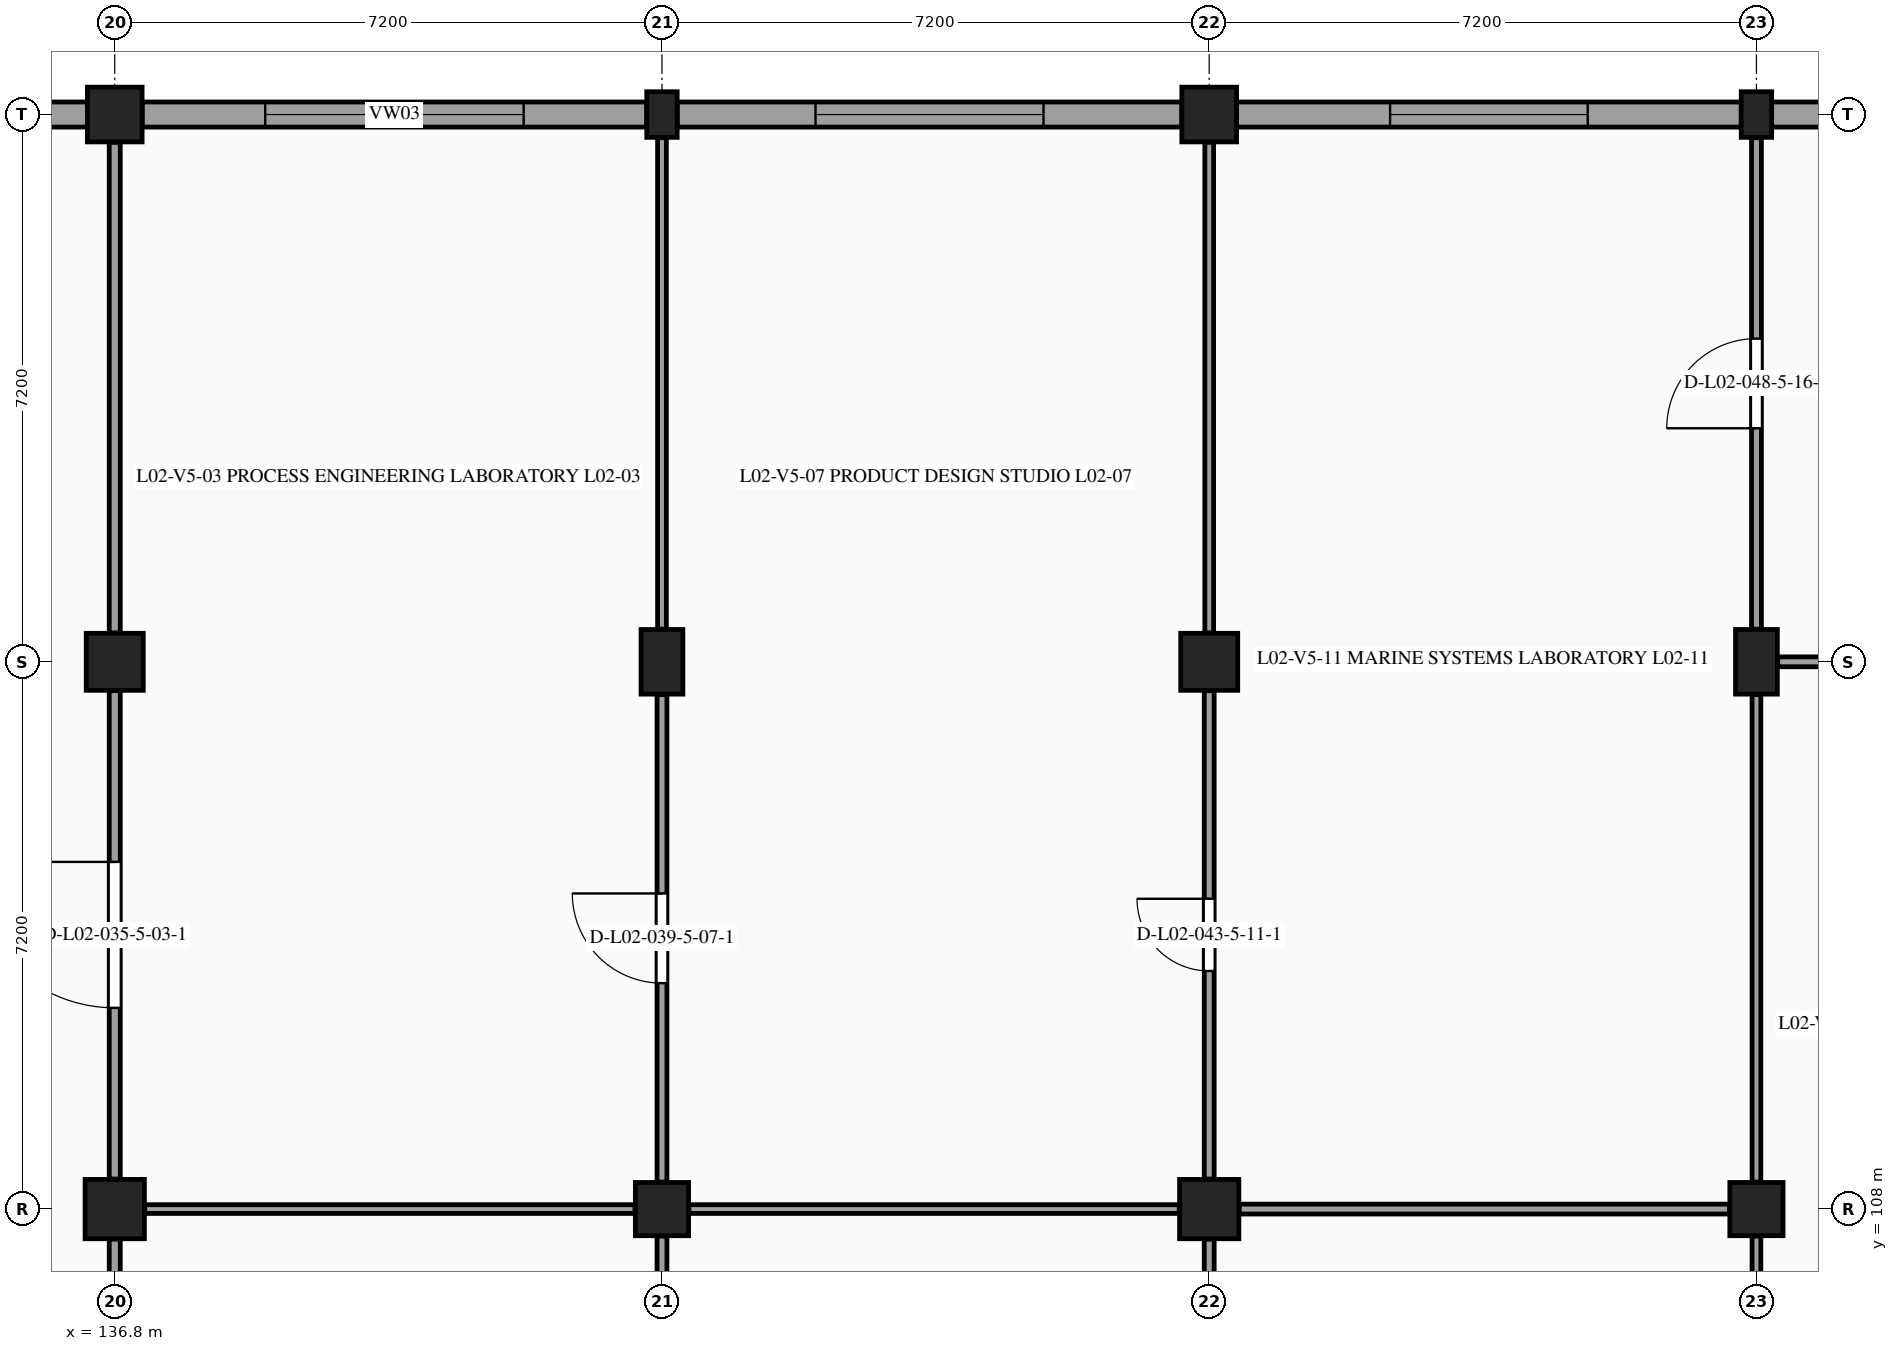
"""IFC4 building model, lengths in metres.
Left out: names, types, materials, properties, quantities, classifications, styles, units other than length and angle.
Written with IfcOpenShell. Run it as: python <this file> out.ifc"""

import sys

from ifc_helpers import new_model, si_unit, direction, frame, frame_2d, origin, origin_2d, place, context, subcontext, project, spatial, rectangle, extrude, element, fill, save


model = new_model("IFC4")
c1 = context("Model", 3, precision=1e-05, world=origin(), true_north=direction((0.0, 1.0)))
c2 = subcontext(c1, "Body", "Model", "MODEL_VIEW")
j1 = project(units=[si_unit("LENGTHUNIT", "METRE"), si_unit("PLANEANGLEUNIT", "RADIAN")], contexts=[c1])
p1 = place(None, origin())
s1 = spatial("IfcSite", under=j1, at=p1, CompositionType="ELEMENT")
p2 = place(p1, origin())
s2 = spatial("IfcBuilding", under=s1, at=p2, CompositionType="ELEMENT")
p3 = place(p2, frame((0.0, 0.0, 9.9)))
s3 = spatial("IfcBuildingStorey", under=s2, at=p3, CompositionType="ELEMENT", Elevation=9.9)
p4 = place(p3, frame((136.8, 108.0, 0.0), z_axis=(0.0, 0.0, 1.0), x_axis=(1.0, 0.0, 0.0)))
e1 = element("IfcColumn", 1, at=p4, inside=s3, PredefinedType="COLUMN", context=c2, shape_type="SweptSolid", body=[
    extrude(rectangle(XDim=0.78, YDim=0.78, at=origin_2d()), origin(), (0.0, 0.0, 1.0), 4.5),
])
p5 = place(p3, frame((136.8, 115.2, 0.0), z_axis=(0.0, 0.0, 1.0), x_axis=(1.0, 0.0, 0.0)))
e2 = element("IfcColumn", 2, at=p5, inside=s3, PredefinedType="COLUMN", context=c2, shape_type="SweptSolid", body=[
    extrude(rectangle(XDim=0.75, YDim=0.75, at=origin_2d()), origin(), (0.0, 0.0, 1.0), 4.5),
])
p6 = place(p3, frame((136.8, 122.4, 0.0), z_axis=(0.0, 0.0, 1.0), x_axis=(1.0, 0.0, 0.0)))
e3 = element("IfcColumn", 3, at=p6, inside=s3, PredefinedType="COLUMN", context=c2, shape_type="SweptSolid", body=[
    extrude(rectangle(XDim=0.72, YDim=0.72, at=origin_2d()), origin(), (0.0, 0.0, 1.0), 4.5),
])
p7 = place(p3, frame((144.0, 108.0, 0.0), z_axis=(0.0, 0.0, 1.0), x_axis=(1.0, 0.0, 0.0)))
e4 = element("IfcColumn", 4, at=p7, inside=s3, PredefinedType="COLUMN", context=c2, shape_type="SweptSolid", body=[
    extrude(rectangle(XDim=0.7, YDim=0.7, at=origin_2d()), origin(), (0.0, 0.0, 1.0), 4.5),
])
p8 = place(p3, frame((144.0, 115.2, 0.0), z_axis=(0.0, 0.0, 1.0), x_axis=(1.0, 0.0, 0.0)))
e5 = element("IfcColumn", 5, at=p8, inside=s3, PredefinedType="COLUMN", context=c2, shape_type="SweptSolid", body=[
    extrude(rectangle(XDim=0.55, YDim=0.85, at=origin_2d()), origin(), (0.0, 0.0, 1.0), 4.5),
])
p9 = place(p3, frame((144.0, 122.4, 0.0), z_axis=(0.0, 0.0, 1.0), x_axis=(1.0, 0.0, 0.0)))
e6 = element("IfcColumn", 6, at=p9, inside=s3, PredefinedType="PILASTER", context=c2, shape_type="SweptSolid", body=[
    extrude(rectangle(XDim=0.4, YDim=0.6, at=origin_2d()), origin(), (0.0, 0.0, 1.0), 4.5),
])
p10 = place(p3, frame((151.2, 108.0, 0.0), z_axis=(0.0, 0.0, 1.0), x_axis=(1.0, 0.0, 0.0)))
e7 = element("IfcColumn", 7, at=p10, inside=s3, PredefinedType="COLUMN", context=c2, shape_type="SweptSolid", body=[
    extrude(rectangle(XDim=0.78, YDim=0.78, at=origin_2d()), origin(), (0.0, 0.0, 1.0), 4.5),
])
p11 = place(p3, frame((151.2, 115.2, 0.0), z_axis=(0.0, 0.0, 1.0), x_axis=(1.0, 0.0, 0.0)))
e8 = element("IfcColumn", 8, at=p11, inside=s3, PredefinedType="COLUMN", context=c2, shape_type="SweptSolid", body=[
    extrude(rectangle(XDim=0.75, YDim=0.75, at=origin_2d()), origin(), (0.0, 0.0, 1.0), 4.5),
])
p12 = place(p3, frame((151.2, 122.4, 0.0), z_axis=(0.0, 0.0, 1.0), x_axis=(1.0, 0.0, 0.0)))
e9 = element("IfcColumn", 9, at=p12, inside=s3, PredefinedType="COLUMN", context=c2, shape_type="SweptSolid", body=[
    extrude(rectangle(XDim=0.72, YDim=0.72, at=origin_2d()), origin(), (0.0, 0.0, 1.0), 4.5),
])
p13 = place(p3, frame((158.4, 108.0, 0.0), z_axis=(0.0, 0.0, 1.0), x_axis=(1.0, 0.0, 0.0)))
e10 = element("IfcColumn", 10, at=p13, inside=s3, PredefinedType="COLUMN", context=c2, shape_type="SweptSolid", body=[
    extrude(rectangle(XDim=0.7, YDim=0.7, at=origin_2d()), origin(), (0.0, 0.0, 1.0), 4.5),
])
p14 = place(p3, frame((158.4, 115.2, 0.0), z_axis=(0.0, 0.0, 1.0), x_axis=(1.0, 0.0, 0.0)))
e11 = element("IfcColumn", 11, at=p14, inside=s3, PredefinedType="COLUMN", context=c2, shape_type="SweptSolid", body=[
    extrude(rectangle(XDim=0.55, YDim=0.85, at=origin_2d()), origin(), (0.0, 0.0, 1.0), 4.5),
])
p15 = place(p3, frame((158.4, 122.4, 0.0), z_axis=(0.0, 0.0, 1.0), x_axis=(1.0, 0.0, 0.0)))
e12 = element("IfcColumn", 12, at=p15, inside=s3, PredefinedType="PILASTER", context=c2, shape_type="SweptSolid", body=[
    extrude(rectangle(XDim=0.4, YDim=0.6, at=origin_2d()), origin(), (0.0, 0.0, 1.0), 4.5),
])
p16 = place(p3, frame((129.8, 122.4, 0.0), z_axis=(0.0, 0.0, 1.0), x_axis=(1.0, 0.0, 0.0)))
e13 = element("IfcWall", 13, at=p16, inside=s3, PredefinedType="STANDARD", context=c2, shape_type="SweptSolid", body=[
    extrude(rectangle(XDim=6.64, YDim=0.33, at=frame_2d((3.32, 0.0))), origin(), (0.0, 0.0, 1.0), 3.47),
])
p17 = place(p16, frame((1.32, 0.0, 0.98)))
e14 = element("IfcOpeningElement", 14, at=p17, cuts=e13, PredefinedType="OPENING", context=c2, shape_type="SweptSolid", body=[
    extrude(rectangle(XDim=4.0, YDim=1.55, at=frame_2d((2.0, 0.775))), frame((0.0, 0.175, 0.0), z_axis=(0.0, -1.0, 0.0), x_axis=(1.0, 0.0, 0.0)), (0.0, 0.0, 1.0), 0.35),
])
p18 = place(p3, frame((137.16, 122.4, 0.0), z_axis=(0.0, 0.0, 1.0), x_axis=(1.0, 0.0, 0.0)))
e15 = element("IfcWall", 15, at=p18, inside=s3, PredefinedType="STANDARD", context=c2, shape_type="SweptSolid", body=[
    extrude(rectangle(XDim=6.64, YDim=0.33, at=frame_2d((3.32, 0.0))), origin(), (0.0, 0.0, 1.0), 3.47),
])
p19 = place(p18, frame((1.62, 0.0, 0.98)))
e16 = element("IfcOpeningElement", 16, at=p19, cuts=e15, PredefinedType="OPENING", context=c2, shape_type="SweptSolid", body=[
    extrude(rectangle(XDim=3.4, YDim=1.55, at=frame_2d((1.7, 0.775))), frame((0.0, 0.175, 0.0), z_axis=(0.0, -1.0, 0.0), x_axis=(1.0, 0.0, 0.0)), (0.0, 0.0, 1.0), 0.35),
])
p20 = place(p3, frame((144.2, 122.4, 0.0), z_axis=(0.0, 0.0, 1.0), x_axis=(1.0, 0.0, 0.0)))
e17 = element("IfcWall", 17, at=p20, inside=s3, PredefinedType="STANDARD", context=c2, shape_type="SweptSolid", body=[
    extrude(rectangle(XDim=6.64, YDim=0.33, at=frame_2d((3.32, 0.0))), origin(), (0.0, 0.0, 1.0), 3.47),
])
p21 = place(p20, frame((1.82, 0.0, 0.98)))
e18 = element("IfcOpeningElement", 18, at=p21, cuts=e17, PredefinedType="OPENING", context=c2, shape_type="SweptSolid", body=[
    extrude(rectangle(XDim=3.0, YDim=1.5, at=frame_2d((1.5, 0.75))), frame((0.0, 0.175, 0.0), z_axis=(0.0, -1.0, 0.0), x_axis=(1.0, 0.0, 0.0)), (0.0, 0.0, 1.0), 0.35),
])
p22 = place(p3, frame((151.56, 122.4, 0.0), z_axis=(0.0, 0.0, 1.0), x_axis=(1.0, 0.0, 0.0)))
e19 = element("IfcWall", 19, at=p22, inside=s3, PredefinedType="STANDARD", context=c2, shape_type="SweptSolid", body=[
    extrude(rectangle(XDim=6.64, YDim=0.33, at=frame_2d((3.32, 0.0))), origin(), (0.0, 0.0, 1.0), 3.47),
])
p23 = place(p22, frame((2.02, 0.0, 0.98)))
e20 = element("IfcOpeningElement", 20, at=p23, cuts=e19, PredefinedType="OPENING", context=c2, shape_type="SweptSolid", body=[
    extrude(rectangle(XDim=2.6, YDim=1.5, at=frame_2d((1.3, 0.75))), frame((0.0, 0.175, 0.0), z_axis=(0.0, -1.0, 0.0), x_axis=(1.0, 0.0, 0.0)), (0.0, 0.0, 1.0), 0.35),
])
p24 = place(p3, frame((158.6, 122.4, 0.0), z_axis=(0.0, 0.0, 1.0), x_axis=(1.0, 0.0, 0.0)))
e21 = element("IfcWall", 21, at=p24, inside=s3, PredefinedType="STANDARD", context=c2, shape_type="SweptSolid", body=[
    extrude(rectangle(XDim=6.64, YDim=0.33, at=frame_2d((3.32, 0.0))), origin(), (0.0, 0.0, 1.0), 3.47),
])
p25 = place(p24, frame((2.22, 0.0, 0.98)))
e22 = element("IfcOpeningElement", 22, at=p25, cuts=e21, PredefinedType="OPENING", context=c2, shape_type="SweptSolid", body=[
    extrude(rectangle(XDim=2.2, YDim=1.45, at=frame_2d((1.1, 0.725))), frame((0.0, 0.175, 0.0), z_axis=(0.0, -1.0, 0.0), x_axis=(1.0, 0.0, 0.0)), (0.0, 0.0, 1.0), 0.35),
])
p26 = place(p3, frame((136.8, 101.105, 0.0), z_axis=(0.0, 0.0, 1.0), x_axis=(0.0, 1.0, 0.0)))
e23 = element("IfcWall", 23, at=p26, inside=s3, PredefinedType="PARTITIONING", context=c2, shape_type="SweptSolid", body=[
    extrude(rectangle(XDim=6.5, YDim=0.145, at=frame_2d((3.25, 0.0))), origin(), (0.0, 0.0, 1.0), 3.54),
])
p27 = place(p3, frame((136.8, 108.395, 0.0), z_axis=(0.0, 0.0, 1.0), x_axis=(0.0, 1.0, 0.0)))
e24 = element("IfcWall", 24, at=p27, inside=s3, PredefinedType="PARTITIONING", context=c2, shape_type="SweptSolid", body=[
    extrude(rectangle(XDim=6.425, YDim=0.145, at=frame_2d((3.212, 0.0))), origin(), (0.0, 0.0, 1.0), 3.535),
])
p28 = place(p27, frame((2.252, 0.0, 0.0)))
e25 = element("IfcOpeningElement", 25, at=p28, cuts=e24, PredefinedType="OPENING", context=c2, shape_type="SweptSolid", body=[
    extrude(rectangle(XDim=1.92, YDim=2.35, at=frame_2d((0.96, 1.175))), frame((0.0, 0.083, 0.0), z_axis=(0.0, -1.0, 0.0), x_axis=(1.0, 0.0, 0.0)), (0.0, 0.0, 1.0), 0.165),
])
p29 = place(p3, frame((136.8, 115.58, 0.0), z_axis=(0.0, 0.0, 1.0), x_axis=(0.0, 1.0, 0.0)))
e26 = element("IfcWall", 26, at=p29, inside=s3, PredefinedType="PARTITIONING", context=c2, shape_type="SweptSolid", body=[
    extrude(rectangle(XDim=6.455, YDim=0.145, at=frame_2d((3.228, 0.0))), origin(), (0.0, 0.0, 1.0), 3.53),
])
p30 = place(p3, frame((144.0, 101.165, 0.0), z_axis=(0.0, 0.0, 1.0), x_axis=(0.0, 1.0, 0.0)))
e27 = element("IfcWall", 27, at=p30, inside=s3, PredefinedType="PARTITIONING", context=c2, shape_type="SweptSolid", body=[
    extrude(rectangle(XDim=6.48, YDim=0.13, at=frame_2d((3.24, 0.0))), origin(), (0.0, 0.0, 1.0), 3.54),
])
p31 = place(p3, frame((137.195, 108.0, 0.0), z_axis=(0.0, 0.0, 1.0), x_axis=(1.0, 0.0, 0.0)))
e28 = element("IfcWall", 28, at=p31, inside=s3, PredefinedType="PARTITIONING", context=c2, shape_type="SweptSolid", body=[
    extrude(rectangle(XDim=6.45, YDim=0.115, at=frame_2d((3.225, 0.0))), origin(), (0.0, 0.0, 1.0), 3.475),
])
p32 = place(p3, frame((144.0, 108.355, 0.0), z_axis=(0.0, 0.0, 1.0), x_axis=(0.0, 1.0, 0.0)))
e29 = element("IfcWall", 29, at=p32, inside=s3, PredefinedType="PARTITIONING", context=c2, shape_type="SweptSolid", body=[
    extrude(rectangle(XDim=6.415, YDim=0.13, at=frame_2d((3.208, 0.0))), origin(), (0.0, 0.0, 1.0), 3.535),
])
p33 = place(p32, frame((2.617, 0.0, 0.0)))
e30 = element("IfcOpeningElement", 30, at=p33, cuts=e29, PredefinedType="OPENING", context=c2, shape_type="SweptSolid", body=[
    extrude(rectangle(XDim=1.18, YDim=2.18, at=frame_2d((0.59, 1.09))), frame((0.0, 0.075, 0.0), z_axis=(0.0, -1.0, 0.0), x_axis=(1.0, 0.0, 0.0)), (0.0, 0.0, 1.0), 0.15),
])
p34 = place(p3, frame((144.0, 115.63, 0.0), z_axis=(0.0, 0.0, 1.0), x_axis=(0.0, 1.0, 0.0)))
e31 = element("IfcWall", 31, at=p34, inside=s3, PredefinedType="PARTITIONING", context=c2, shape_type="SweptSolid", body=[
    extrude(rectangle(XDim=6.465, YDim=0.115, at=frame_2d((3.232, 0.0))), origin(), (0.0, 0.0, 1.0), 3.53),
])
p35 = place(p3, frame((151.2, 101.105, 0.0), z_axis=(0.0, 0.0, 1.0), x_axis=(0.0, 1.0, 0.0)))
e32 = element("IfcWall", 32, at=p35, inside=s3, PredefinedType="PARTITIONING", context=c2, shape_type="SweptSolid", body=[
    extrude(rectangle(XDim=6.5, YDim=0.13, at=frame_2d((3.25, 0.0))), origin(), (0.0, 0.0, 1.0), 3.54),
])
p36 = place(p3, frame((144.355, 108.0, 0.0), z_axis=(0.0, 0.0, 1.0), x_axis=(1.0, 0.0, 0.0)))
e33 = element("IfcWall", 33, at=p36, inside=s3, PredefinedType="PARTITIONING", context=c2, shape_type="SweptSolid", body=[
    extrude(rectangle(XDim=6.45, YDim=0.115, at=frame_2d((3.225, 0.0))), origin(), (0.0, 0.0, 1.0), 3.485),
])
p37 = place(p3, frame((151.2, 108.395, 0.0), z_axis=(0.0, 0.0, 1.0), x_axis=(0.0, 1.0, 0.0)))
e34 = element("IfcWall", 34, at=p37, inside=s3, PredefinedType="PARTITIONING", context=c2, shape_type="SweptSolid", body=[
    extrude(rectangle(XDim=6.425, YDim=0.13, at=frame_2d((3.212, 0.0))), origin(), (0.0, 0.0, 1.0), 3.535),
])
p38 = place(p37, frame((2.738, 0.0, 0.0)))
e35 = element("IfcOpeningElement", 35, at=p38, cuts=e34, PredefinedType="OPENING", context=c2, shape_type="SweptSolid", body=[
    extrude(rectangle(XDim=0.95, YDim=2.15, at=frame_2d((0.475, 1.075))), frame((0.0, 0.075, 0.0), z_axis=(0.0, -1.0, 0.0), x_axis=(1.0, 0.0, 0.0)), (0.0, 0.0, 1.0), 0.15),
])
p39 = place(p3, frame((151.2, 115.58, 0.0), z_axis=(0.0, 0.0, 1.0), x_axis=(0.0, 1.0, 0.0)))
e36 = element("IfcWall", 36, at=p39, inside=s3, PredefinedType="PARTITIONING", context=c2, shape_type="SweptSolid", body=[
    extrude(rectangle(XDim=6.455, YDim=0.115, at=frame_2d((3.228, 0.0))), origin(), (0.0, 0.0, 1.0), 3.53),
])
p40 = place(p3, frame((158.4, 101.165, 0.0), z_axis=(0.0, 0.0, 1.0), x_axis=(0.0, 1.0, 0.0)))
e37 = element("IfcWall", 37, at=p40, inside=s3, PredefinedType="PARTITIONING", context=c2, shape_type="SweptSolid", body=[
    extrude(rectangle(XDim=6.48, YDim=0.115, at=frame_2d((3.24, 0.0))), origin(), (0.0, 0.0, 1.0), 3.54),
])
p41 = place(p40, frame((2.55, 0.0, 0.0)))
e38 = element("IfcOpeningElement", 38, at=p41, cuts=e37, PredefinedType="OPENING", context=c2, shape_type="SweptSolid", body=[
    extrude(rectangle(XDim=1.38, YDim=2.22, at=frame_2d((0.69, 1.11))), frame((0.0, 0.067, 0.0), z_axis=(0.0, -1.0, 0.0), x_axis=(1.0, 0.0, 0.0)), (0.0, 0.0, 1.0), 0.135),
])
p42 = place(p3, frame((151.595, 108.0, 0.0), z_axis=(0.0, 0.0, 1.0), x_axis=(1.0, 0.0, 0.0)))
e39 = element("IfcWall", 39, at=p42, inside=s3, PredefinedType="PARTITIONING", context=c2, shape_type="SweptSolid", body=[
    extrude(rectangle(XDim=6.45, YDim=0.13, at=frame_2d((3.225, 0.0))), origin(), (0.0, 0.0, 1.0), 3.5),
])
p43 = place(p3, frame((158.4, 108.355, 0.0), z_axis=(0.0, 0.0, 1.0), x_axis=(0.0, 1.0, 0.0)))
e40 = element("IfcWall", 40, at=p43, inside=s3, PredefinedType="PARTITIONING", context=c2, shape_type="SweptSolid", body=[
    extrude(rectangle(XDim=6.415, YDim=0.115, at=frame_2d((3.208, 0.0))), origin(), (0.0, 0.0, 1.0), 3.535),
])
p44 = place(p3, frame((158.4, 115.63, 0.0), z_axis=(0.0, 0.0, 1.0), x_axis=(0.0, 1.0, 0.0)))
e41 = element("IfcWall", 41, at=p44, inside=s3, PredefinedType="PARTITIONING", context=c2, shape_type="SweptSolid", body=[
    extrude(rectangle(XDim=6.465, YDim=0.13, at=frame_2d((3.232, 0.0))), origin(), (0.0, 0.0, 1.0), 3.53),
])
p45 = place(p44, frame((2.643, 0.0, 0.0)))
e42 = element("IfcOpeningElement", 42, at=p45, cuts=e41, PredefinedType="OPENING", context=c2, shape_type="SweptSolid", body=[
    extrude(rectangle(XDim=1.18, YDim=2.18, at=frame_2d((0.59, 1.09))), frame((0.0, 0.075, 0.0), z_axis=(0.0, -1.0, 0.0), x_axis=(1.0, 0.0, 0.0)), (0.0, 0.0, 1.0), 0.15),
])
p46 = place(p3, frame((158.68, 115.2, 0.0), z_axis=(0.0, 0.0, 1.0), x_axis=(1.0, 0.0, 0.0)))
e43 = element("IfcWall", 43, at=p46, inside=s3, PredefinedType="PARTITIONING", context=c2, shape_type="SweptSolid", body=[
    extrude(rectangle(XDim=6.54, YDim=0.13, at=frame_2d((3.27, 0.0))), origin(), (0.0, 0.0, 1.0), 3.505),
])
p47 = place(p19, origin())
e44 = element("IfcWindow", 44, at=p47, inside=s3, PartitioningType="SINGLE_PANEL", PredefinedType="WINDOW", context=c2, shape_type="SweptSolid", body=[
    extrude(rectangle(XDim=3.4, YDim=1.55, at=frame_2d((1.7, 0.775))), frame((0.0, -0.03, 0.0), z_axis=(0.0, -1.0, 0.0), x_axis=(1.0, 0.0, 0.0)), (0.0, 0.0, 1.0), 0.06),
])
fill(e16, e44)
p48 = place(p21, origin())
e45 = element("IfcWindow", 45, at=p48, inside=s3, PartitioningType="SINGLE_PANEL", PredefinedType="WINDOW", context=c2, shape_type="SweptSolid", body=[
    extrude(rectangle(XDim=3.0, YDim=1.5, at=frame_2d((1.5, 0.75))), frame((0.0, -0.03, 0.0), z_axis=(0.0, -1.0, 0.0), x_axis=(1.0, 0.0, 0.0)), (0.0, 0.0, 1.0), 0.06),
])
fill(e18, e45)
p49 = place(p23, origin())
e46 = element("IfcWindow", 46, at=p49, inside=s3, PartitioningType="SINGLE_PANEL", PredefinedType="WINDOW", context=c2, shape_type="SweptSolid", body=[
    extrude(rectangle(XDim=2.6, YDim=1.5, at=frame_2d((1.3, 0.75))), frame((0.0, -0.03, 0.0), z_axis=(0.0, -1.0, 0.0), x_axis=(1.0, 0.0, 0.0)), (0.0, 0.0, 1.0), 0.06),
])
fill(e20, e46)
p50 = place(p28, origin())
e47 = element("IfcDoor", 47, at=p50, inside=s3, OperationType="SINGLE_SWING_RIGHT", PredefinedType="DOOR", context=c2, shape_type="SweptSolid", body=[
    extrude(rectangle(XDim=1.92, YDim=2.35, at=frame_2d((0.96, 1.175))), frame((0.0, 0.025, 0.0), z_axis=(0.0, -1.0, 0.0), x_axis=(1.0, 0.0, 0.0)), (0.0, 0.0, 1.0), 0.05),
])
fill(e25, e47)
p51 = place(p33, origin())
e48 = element("IfcDoor", 48, at=p51, inside=s3, OperationType="SINGLE_SWING_RIGHT", PredefinedType="DOOR", context=c2, shape_type="SweptSolid", body=[
    extrude(rectangle(XDim=1.18, YDim=2.18, at=frame_2d((0.59, 1.09))), frame((0.0, 0.025, 0.0), z_axis=(0.0, -1.0, 0.0), x_axis=(1.0, 0.0, 0.0)), (0.0, 0.0, 1.0), 0.05),
])
fill(e30, e48)
p52 = place(p38, origin())
e49 = element("IfcDoor", 49, at=p52, inside=s3, OperationType="SINGLE_SWING_RIGHT", PredefinedType="DOOR", context=c2, shape_type="SweptSolid", body=[
    extrude(rectangle(XDim=0.95, YDim=2.15, at=frame_2d((0.475, 1.075))), frame((0.0, 0.025, 0.0), z_axis=(0.0, -1.0, 0.0), x_axis=(1.0, 0.0, 0.0)), (0.0, 0.0, 1.0), 0.05),
])
fill(e35, e49)
p53 = place(p45, origin())
e50 = element("IfcDoor", 50, at=p53, inside=s3, OperationType="SINGLE_SWING_LEFT", PredefinedType="DOOR", context=c2, shape_type="SweptSolid", body=[
    extrude(rectangle(XDim=1.18, YDim=2.18, at=frame_2d((0.59, 1.09))), frame((0.0, 0.025, 0.0), z_axis=(0.0, -1.0, 0.0), x_axis=(1.0, 0.0, 0.0)), (0.0, 0.0, 1.0), 0.05),
])
fill(e42, e50)
save(model, sys.argv[1])
